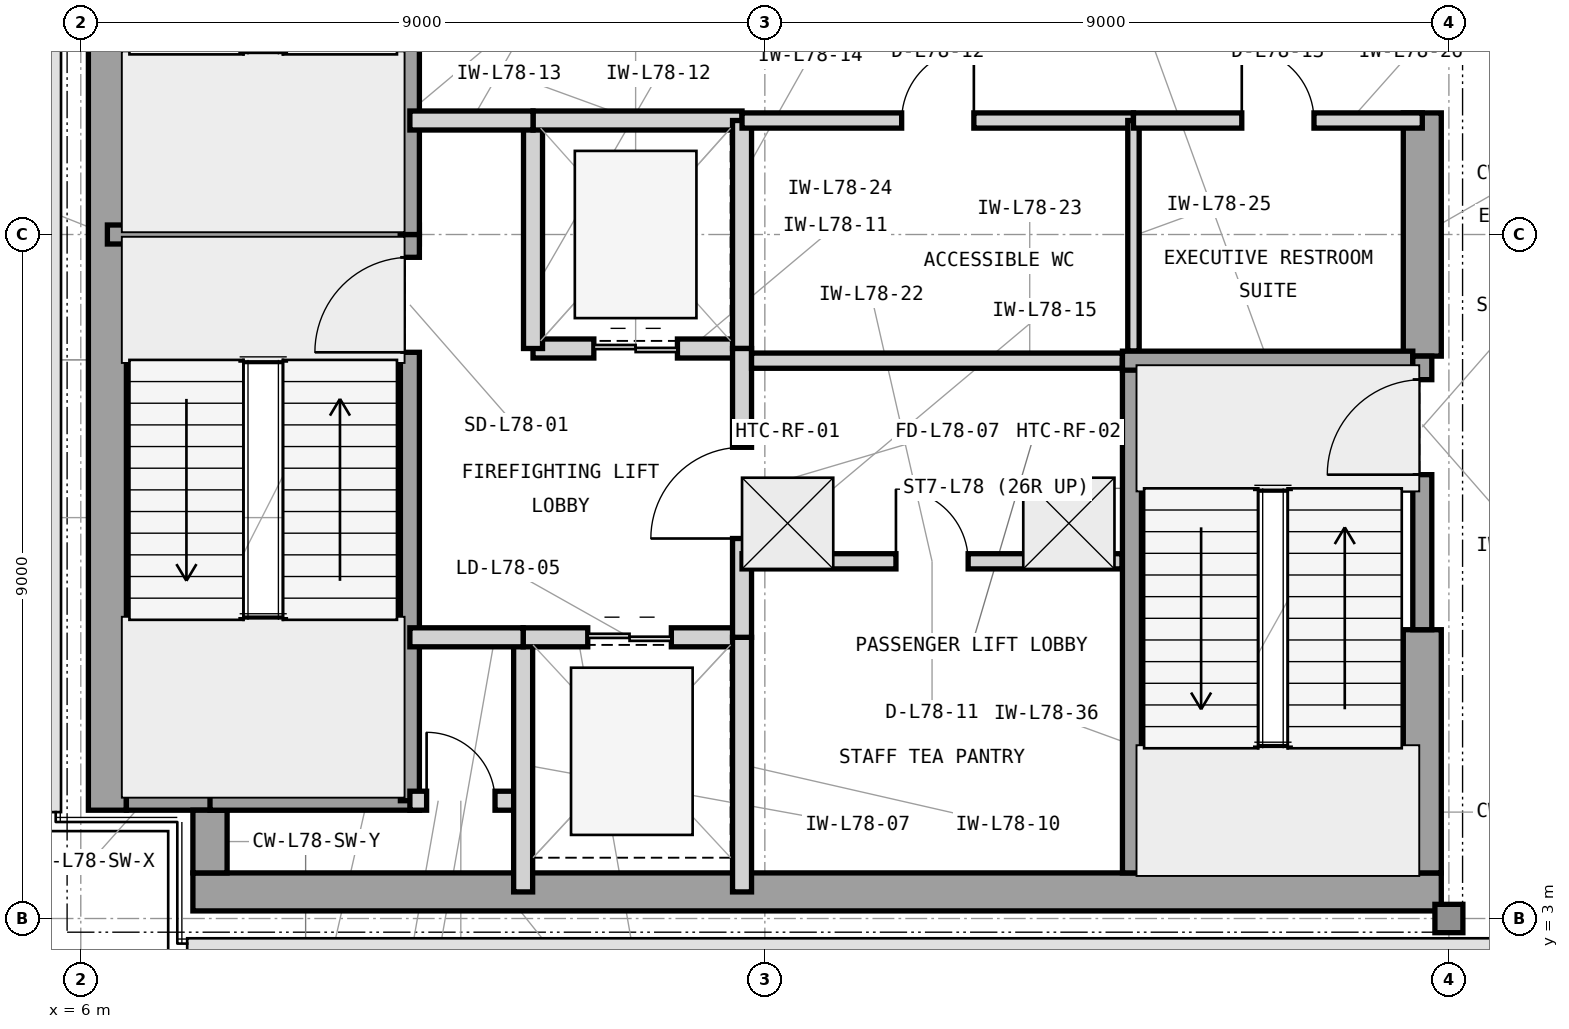
"""IFC4 building model, lengths in metres.
Left out: names, types, materials, properties, quantities, classifications, styles, units other than length and angle.
Written with IfcOpenShell. Run it as: python <this file> out.ifc"""

import sys

from ifc_helpers import new_model, si_unit, direction, frame, frame_2d, origin, origin_2d, place, context, subcontext, project, spatial, rectangle, i_section, extrude, element, fill, save


model = new_model("IFC4")
c1 = context("Model", 3, precision=1e-05, world=origin(), true_north=direction((0.0, 1.0)))
c2 = subcontext(c1, "Body", "Model", "MODEL_VIEW")
j1 = project(units=[si_unit("LENGTHUNIT", "METRE"), si_unit("PLANEANGLEUNIT", "RADIAN")], contexts=[c1])
p1 = place(None, origin())
s1 = spatial("IfcSite", under=j1, at=p1, CompositionType="ELEMENT")
p2 = place(p1, origin())
s2 = spatial("IfcBuilding", under=s1, at=p2, CompositionType="ELEMENT")
p3 = place(p2, frame((0.0, 0.0, 317.7)))
s3 = spatial("IfcBuildingStorey", under=s2, at=p3, CompositionType="ELEMENT", Elevation=317.7)
p4 = place(p3, frame((7.475, 3.35, 0.0), z_axis=(0.0, 0.0, 1.0), x_axis=(1.0, 0.0, 0.0)))
e1 = element("IfcWall", 1, at=p4, inside=s3, PredefinedType="SHEAR", context=c2, shape_type="SweptSolid", body=[
    extrude(rectangle(XDim=16.425, YDim=0.5, at=frame_2d((8.212, 0.0))), origin(), (0.0, 0.0, 1.0), 4.5),
])
p5 = place(p3, frame((6.35, 4.425, 0.0), z_axis=(0.0, 0.0, 1.0), x_axis=(0.0, 1.0, 0.0)))
e2 = element("IfcWall", 2, at=p5, inside=s3, PredefinedType="SHEAR", context=c2, shape_type="SweptSolid", body=[
    extrude(rectangle(XDim=15.15, YDim=0.5, at=frame_2d((7.575, 0.0))), origin(), (0.0, 0.0, 1.0), 4.5),
])
p6 = place(p3, frame((23.65, 3.6, 0.0), z_axis=(0.0, 0.0, 1.0), x_axis=(0.0, 1.0, 0.0)))
e3 = element("IfcWall", 3, at=p6, inside=s3, PredefinedType="SHEAR", context=c2, shape_type="SweptSolid", body=[
    extrude(rectangle(XDim=3.2, YDim=0.5, at=frame_2d((1.6, 0.0))), origin(), (0.0, 0.0, 1.0), 4.5),
])
p7 = place(p3, frame((23.65, 10.4, 0.0), z_axis=(0.0, 0.0, 1.0), x_axis=(0.0, 1.0, 0.0)))
e4 = element("IfcWall", 4, at=p7, inside=s3, PredefinedType="SHEAR", context=c2, shape_type="SweptSolid", body=[
    extrude(rectangle(XDim=3.2, YDim=0.5, at=frame_2d((1.6, 0.0))), origin(), (0.0, 0.0, 1.0), 4.5),
])
p8 = place(p3, frame((6.6, 4.65, 0.0), z_axis=(0.0, 0.0, 1.0), x_axis=(1.0, 0.0, 0.0)))
e5 = element("IfcWall", 5, at=p8, inside=s3, PredefinedType="SHEAR", context=c2, shape_type="SweptSolid", body=[
    extrude(rectangle(XDim=1.325, YDim=0.45, at=frame_2d((0.663, 0.0))), origin(), (0.0, 0.0, 1.0), 4.5),
])
p9 = place(p3, frame((7.7, 3.6, 0.0), z_axis=(0.0, 0.0, 1.0), x_axis=(0.0, 1.0, 0.0)))
e6 = element("IfcWall", 6, at=p9, inside=s3, PredefinedType="SHEAR", context=c2, shape_type="SweptSolid", body=[
    extrude(rectangle(XDim=0.825, YDim=0.45, at=frame_2d((0.413, 0.0))), origin(), (0.0, 0.0, 1.0), 4.5),
])
p10 = place(p3, frame((24.0, 3.0, 0.0), z_axis=(0.0, 0.0, 1.0), x_axis=(1.0, 0.0, 0.0)))
e7 = element("IfcColumn", 7, at=p10, inside=s3, PredefinedType="COLUMN", context=c2, shape_type="SweptSolid", body=[
    extrude(i_section(OverallWidth=0.373, OverallDepth=0.368, WebThickness=0.015, FlangeThickness=0.024, FilletRadius=0.019, at=origin_2d()), origin(), (0.0, 0.0, 1.0), 4.5),
])
p11 = place(p3, frame((6.35, 12.0, 0.0), z_axis=(0.0, 0.0, 1.0), x_axis=(1.0, 0.0, 0.0)))
e8 = element("IfcWall", 8, at=p11, inside=s3, PredefinedType="SHEAR", context=c2, shape_type="SweptSolid", body=[
    extrude(rectangle(XDim=4.105, YDim=0.25, at=frame_2d((2.052, 0.0))), origin(), (0.0, 0.0, 1.0), 4.5),
])
p12 = place(p3, frame((7.7, 4.55, 0.0), z_axis=(0.0, 0.0, 1.0), x_axis=(1.0, 0.0, 0.0)))
e9 = element("IfcWall", 9, at=p12, inside=s3, PredefinedType="SHEAR", context=c2, shape_type="SweptSolid", body=[
    extrude(rectangle(XDim=2.755, YDim=0.25, at=frame_2d((1.377, 0.0))), origin(), (0.0, 0.0, 1.0), 4.5),
])
p13 = place(p3, frame((10.33, 4.55, 0.0), z_axis=(0.0, 0.0, 1.0), x_axis=(0.0, 1.0, 0.0)))
e10 = element("IfcWall", 10, at=p13, inside=s3, PredefinedType="SHEAR", context=c2, shape_type="SweptSolid", body=[
    extrude(rectangle(XDim=7.45, YDim=0.25, at=frame_2d((3.725, 0.0))), origin(), (0.0, 0.0, 1.0), 4.5),
])
p14 = place(p13, frame((5.9, 0.0, 0.0)))
e11 = element("IfcOpeningElement", 11, at=p14, cuts=e10, PredefinedType="OPENING", context=c2, shape_type="SweptSolid", body=[
    extrude(rectangle(XDim=1.25, YDim=2.2, at=frame_2d((0.625, 1.1))), frame((0.0, 0.135, 0.0), z_axis=(0.0, -1.0, 0.0), x_axis=(1.0, 0.0, 0.0)), (0.0, 0.0, 1.0), 0.27),
])
p15 = place(p3, frame((10.33, 12.0, 0.0), z_axis=(0.0, 0.0, 1.0), x_axis=(0.0, 1.0, 0.0)))
e12 = element("IfcWall", 12, at=p15, inside=s3, PredefinedType="SHEAR", context=c2, shape_type="SweptSolid", body=[
    extrude(rectangle(XDim=7.45, YDim=0.25, at=frame_2d((3.725, 0.0))), origin(), (0.0, 0.0, 1.0), 4.5),
])
p16 = place(p15, frame((5.85, 0.0, 0.0)))
e13 = element("IfcOpeningElement", 13, at=p16, cuts=e12, PredefinedType="OPENING", context=c2, shape_type="SweptSolid", body=[
    extrude(rectangle(XDim=1.25, YDim=2.2, at=frame_2d((0.625, 1.1))), frame((0.0, 0.135, 0.0), z_axis=(0.0, -1.0, 0.0), x_axis=(1.0, 0.0, 0.0)), (0.0, 0.0, 1.0), 0.27),
])
p17 = place(p3, frame((10.33, 4.55, 0.0), z_axis=(0.0, 0.0, 1.0), x_axis=(1.0, 0.0, 0.0)))
e14 = element("IfcWall", 14, at=p17, inside=s3, PredefinedType="PARTITIONING", context=c2, shape_type="SweptSolid", body=[
    extrude(rectangle(XDim=1.49, YDim=0.25, at=frame_2d((0.745, 0.0))), origin(), (0.0, 0.0, 1.0), 4.23),
])
p18 = place(p17, frame((0.22, 0.0, 0.0)))
e15 = element("IfcOpeningElement", 15, at=p18, cuts=e14, PredefinedType="OPENING", context=c2, shape_type="SweptSolid", body=[
    extrude(rectangle(XDim=0.9, YDim=2.1, at=frame_2d((0.45, 1.05))), frame((0.0, 0.135, 0.0), z_axis=(0.0, -1.0, 0.0), x_axis=(1.0, 0.0, 0.0)), (0.0, 0.0, 1.0), 0.27),
])
p19 = place(p3, frame((11.82, 3.35, 0.0), z_axis=(0.0, 0.0, 1.0), x_axis=(0.0, 1.0, 0.0)))
e16 = element("IfcWall", 16, at=p19, inside=s3, PredefinedType="PARTITIONING", context=c2, shape_type="SweptSolid", body=[
    extrude(rectangle(XDim=3.35, YDim=0.25, at=frame_2d((1.675, 0.0))), origin(), (0.0, 0.0, 1.0), 4.23),
])
p20 = place(p3, frame((11.82, 6.7, 0.0), z_axis=(0.0, 0.0, 1.0), x_axis=(1.0, 0.0, 0.0)))
e17 = element("IfcWall", 17, at=p20, inside=s3, PredefinedType="PARTITIONING", context=c2, shape_type="SweptSolid", body=[
    extrude(rectangle(XDim=2.88, YDim=0.25, at=frame_2d((1.44, 0.0))), origin(), (0.0, 0.0, 1.0), 3.92),
])
p21 = place(p20, frame((0.85, 0.0, 0.0)))
e18 = element("IfcOpeningElement", 18, at=p21, cuts=e17, PredefinedType="OPENING", context=c2, shape_type="SweptSolid", body=[
    extrude(rectangle(XDim=1.1, YDim=2.25, at=frame_2d((0.55, 1.125))), frame((0.0, 0.135, 0.0), z_axis=(0.0, -1.0, 0.0), x_axis=(1.0, 0.0, 0.0)), (0.0, 0.0, 1.0), 0.27),
])
p22 = place(p3, frame((14.7, 3.35, 0.0), z_axis=(0.0, 0.0, 1.0), x_axis=(0.0, 1.0, 0.0)))
e19 = element("IfcWall", 19, at=p22, inside=s3, PredefinedType="PARTITIONING", context=c2, shape_type="SweptSolid", body=[
    extrude(rectangle(XDim=3.35, YDim=0.25, at=frame_2d((1.675, 0.0))), origin(), (0.0, 0.0, 1.0), 4.23),
])
p23 = place(p3, frame((11.95, 10.5, 0.0), z_axis=(0.0, 0.0, 1.0), x_axis=(1.0, 0.0, 0.0)))
e20 = element("IfcWall", 20, at=p23, inside=s3, PredefinedType="PARTITIONING", context=c2, shape_type="SweptSolid", body=[
    extrude(rectangle(XDim=2.75, YDim=0.25, at=frame_2d((1.375, 0.0))), origin(), (0.0, 0.0, 1.0), 3.92),
])
p24 = place(p23, frame((0.8, 0.0, 0.0)))
e21 = element("IfcOpeningElement", 21, at=p24, cuts=e20, PredefinedType="OPENING", context=c2, shape_type="SweptSolid", body=[
    extrude(rectangle(XDim=1.1, YDim=2.25, at=frame_2d((0.55, 1.125))), frame((0.0, 0.135, 0.0), z_axis=(0.0, -1.0, 0.0), x_axis=(1.0, 0.0, 0.0)), (0.0, 0.0, 1.0), 0.27),
])
p25 = place(p3, frame((11.95, 10.5, 0.0), z_axis=(0.0, 0.0, 1.0), x_axis=(0.0, 1.0, 0.0)))
e22 = element("IfcWall", 22, at=p25, inside=s3, PredefinedType="PARTITIONING", context=c2, shape_type="SweptSolid", body=[
    extrude(rectangle(XDim=3.0, YDim=0.25, at=frame_2d((1.5, 0.0))), origin(), (0.0, 0.0, 1.0), 4.23),
])
p26 = place(p3, frame((11.95, 13.5, 0.0), z_axis=(0.0, 0.0, 1.0), x_axis=(1.0, 0.0, 0.0)))
e23 = element("IfcWall", 23, at=p26, inside=s3, PredefinedType="PARTITIONING", context=c2, shape_type="SweptSolid", body=[
    extrude(rectangle(XDim=2.75, YDim=0.25, at=frame_2d((1.375, 0.0))), origin(), (0.0, 0.0, 1.0), 3.92),
])
p27 = place(p3, frame((14.7, 10.5, 0.0), z_axis=(0.0, 0.0, 1.0), x_axis=(0.0, 1.0, 0.0)))
e24 = element("IfcWall", 24, at=p27, inside=s3, PredefinedType="PARTITIONING", context=c2, shape_type="SweptSolid", body=[
    extrude(rectangle(XDim=3.0, YDim=0.25, at=frame_2d((1.5, 0.0))), origin(), (0.0, 0.0, 1.0), 4.23),
])
p28 = place(p3, frame((14.7, 6.7, 0.0), z_axis=(0.0, 0.0, 1.0), x_axis=(0.0, 1.0, 0.0)))
e25 = element("IfcWall", 25, at=p28, inside=s3, PredefinedType="PARTITIONING", context=c2, shape_type="SweptSolid", body=[
    extrude(rectangle(XDim=3.8, YDim=0.25, at=frame_2d((1.9, 0.0))), origin(), (0.0, 0.0, 1.0), 4.23),
])
p29 = place(p28, frame((1.3, 0.0, 0.0)))
e26 = element("IfcOpeningElement", 26, at=p29, cuts=e25, PredefinedType="OPENING", context=c2, shape_type="SweptSolid", body=[
    extrude(rectangle(XDim=1.2, YDim=2.2, at=frame_2d((0.6, 1.1))), frame((0.0, 0.135, 0.0), z_axis=(0.0, -1.0, 0.0), x_axis=(1.0, 0.0, 0.0)), (0.0, 0.0, 1.0), 0.27),
])
p30 = place(p3, frame((10.33, 13.5, 0.0), z_axis=(0.0, 0.0, 1.0), x_axis=(1.0, 0.0, 0.0)))
e27 = element("IfcWall", 27, at=p30, inside=s3, PredefinedType="PARTITIONING", context=c2, shape_type="SweptSolid", body=[
    extrude(rectangle(XDim=1.62, YDim=0.25, at=frame_2d((0.81, 0.0))), origin(), (0.0, 0.0, 1.0), 3.92),
])
p31 = place(p3, frame((10.33, 6.7, 0.0), z_axis=(0.0, 0.0, 1.0), x_axis=(1.0, 0.0, 0.0)))
e28 = element("IfcWall", 28, at=p31, inside=s3, PredefinedType="PARTITIONING", context=c2, shape_type="SweptSolid", body=[
    extrude(rectangle(XDim=1.49, YDim=0.25, at=frame_2d((0.745, 0.0))), origin(), (0.0, 0.0, 1.0), 3.92),
])
p32 = place(p3, frame((14.7, 7.7, 0.0), z_axis=(0.0, 0.0, 1.0), x_axis=(1.0, 0.0, 0.0)))
e29 = element("IfcWall", 29, at=p32, inside=s3, PredefinedType="PARTITIONING", context=c2, shape_type="SweptSolid", body=[
    extrude(rectangle(XDim=5.0, YDim=0.2, at=frame_2d((2.5, 0.0))), origin(), (0.0, 0.0, 1.0), 4.23),
])
p33 = place(p32, frame((2.025, 0.0, 0.0)))
e30 = element("IfcOpeningElement", 30, at=p33, cuts=e29, PredefinedType="OPENING", context=c2, shape_type="SweptSolid", body=[
    extrude(rectangle(XDim=0.95, YDim=2.1, at=frame_2d((0.475, 1.05))), frame((0.0, 0.11, 0.0), z_axis=(0.0, -1.0, 0.0), x_axis=(1.0, 0.0, 0.0)), (0.0, 0.0, 1.0), 0.22),
])
p34 = place(p3, frame((14.825, 10.34, 0.0), z_axis=(0.0, 0.0, 1.0), x_axis=(1.0, 0.0, 0.0)))
e31 = element("IfcWall", 31, at=p34, inside=s3, PredefinedType="PARTITIONING", context=c2, shape_type="SweptSolid", body=[
    extrude(rectangle(XDim=4.88, YDim=0.2, at=frame_2d((2.44, 0.0))), origin(), (0.0, 0.0, 1.0), 4.23),
])
p35 = place(p3, frame((14.7, 13.5, 0.0), z_axis=(0.0, 0.0, 1.0), x_axis=(1.0, 0.0, 0.0)))
e32 = element("IfcWall", 32, at=p35, inside=s3, PredefinedType="PARTITIONING", context=c2, shape_type="SweptSolid", body=[
    extrude(rectangle(XDim=5.15, YDim=0.2, at=frame_2d((2.575, 0.0))), origin(), (0.0, 0.0, 1.0), 3.92),
])
p36 = place(p35, frame((2.1, 0.0, 0.0)))
e33 = element("IfcOpeningElement", 33, at=p36, cuts=e32, PredefinedType="OPENING", context=c2, shape_type="SweptSolid", body=[
    extrude(rectangle(XDim=0.95, YDim=2.1, at=frame_2d((0.475, 1.05))), frame((0.0, 0.11, 0.0), z_axis=(0.0, -1.0, 0.0), x_axis=(1.0, 0.0, 0.0)), (0.0, 0.0, 1.0), 0.22),
])
p37 = place(p3, frame((19.85, 10.465, 0.0), z_axis=(0.0, 0.0, 1.0), x_axis=(0.0, 1.0, 0.0)))
e34 = element("IfcWall", 34, at=p37, inside=s3, PredefinedType="PARTITIONING", context=c2, shape_type="SweptSolid", body=[
    extrude(rectangle(XDim=3.035, YDim=0.15, at=frame_2d((1.518, 0.0))), origin(), (0.0, 0.0, 1.0), 4.23),
])
p38 = place(p3, frame((19.85, 13.5, 0.0), z_axis=(0.0, 0.0, 1.0), x_axis=(1.0, 0.0, 0.0)))
e35 = element("IfcWall", 35, at=p38, inside=s3, PredefinedType="PARTITIONING", context=c2, shape_type="SweptSolid", body=[
    extrude(rectangle(XDim=3.8, YDim=0.2, at=frame_2d((1.9, 0.0))), origin(), (0.0, 0.0, 1.0), 3.92),
])
p39 = place(p38, frame((1.425, 0.0, 0.0)))
e36 = element("IfcOpeningElement", 36, at=p39, cuts=e35, PredefinedType="OPENING", context=c2, shape_type="SweptSolid", body=[
    extrude(rectangle(XDim=0.95, YDim=2.1, at=frame_2d((0.475, 1.05))), frame((0.0, 0.11, 0.0), z_axis=(0.0, -1.0, 0.0), x_axis=(1.0, 0.0, 0.0)), (0.0, 0.0, 1.0), 0.22),
])
p40 = place(p3, frame((19.83, 3.6, 0.0), z_axis=(0.0, 0.0, 1.0), x_axis=(0.0, 1.0, 0.0)))
e37 = element("IfcWall", 37, at=p40, inside=s3, PredefinedType="SHEAR", context=c2, shape_type="SweptSolid", body=[
    extrude(rectangle(XDim=6.74, YDim=0.25, at=frame_2d((3.37, 0.0))), origin(), (0.0, 0.0, 1.0), 4.5),
])
p41 = place(p3, frame((19.705, 10.34, 0.0), z_axis=(0.0, 0.0, 1.0), x_axis=(1.0, 0.0, 0.0)))
e38 = element("IfcWall", 38, at=p41, inside=s3, PredefinedType="SHEAR", context=c2, shape_type="SweptSolid", body=[
    extrude(rectangle(XDim=3.82, YDim=0.25, at=frame_2d((1.91, 0.0))), origin(), (0.0, 0.0, 1.0), 4.5),
])
p42 = place(p3, frame((23.65, 6.8, 0.0), z_axis=(0.0, 0.0, 1.0), x_axis=(0.0, 1.0, 0.0)))
e39 = element("IfcWall", 39, at=p42, inside=s3, PredefinedType="SHEAR", context=c2, shape_type="SweptSolid", body=[
    extrude(rectangle(XDim=3.6, YDim=0.25, at=frame_2d((1.8, 0.0))), origin(), (0.0, 0.0, 1.0), 4.5),
])
p43 = place(p42, frame((2.04, 0.0, 0.0)))
e40 = element("IfcOpeningElement", 40, at=p43, cuts=e39, PredefinedType="OPENING", context=c2, shape_type="SweptSolid", body=[
    extrude(rectangle(XDim=1.25, YDim=2.2, at=frame_2d((0.625, 1.1))), frame((0.0, 0.135, 0.0), z_axis=(0.0, -1.0, 0.0), x_axis=(1.0, 0.0, 0.0)), (0.0, 0.0, 1.0), 0.27),
])
p44 = place(p2, frame((0.0, 0.0, 322.2)))
p45 = place(p44, frame((0.0, 0.0, -0.26)))
p46 = place(p45, frame((15.3, 8.2, 0.0)))
p47 = place(p46, frame((0.0, 0.0, 0.21)))
e41 = element("IfcWindow", 41, at=p47, inside=s3, PartitioningType="SINGLE_PANEL", PredefinedType="SKYLIGHT", context=c2, shape_type="SweptSolid", body=[
    extrude(rectangle(XDim=1.2, YDim=1.2, at=origin_2d()), origin(), (0.0, 0.0, 1.0), 0.05),
])
p48 = place(p45, frame((19.0, 8.2, 0.0)))
p49 = place(p48, frame((0.0, 0.0, 0.21)))
e42 = element("IfcWindow", 42, at=p49, inside=s3, PartitioningType="SINGLE_PANEL", PredefinedType="SKYLIGHT", context=c2, shape_type="SweptSolid", body=[
    extrude(rectangle(XDim=1.2, YDim=1.2, at=origin_2d()), origin(), (0.0, 0.0, 1.0), 0.05),
])
p50 = place(p14, origin())
e43 = element("IfcDoor", 43, at=p50, inside=s3, OperationType="SINGLE_SWING_LEFT", PredefinedType="DOOR", context=c2, shape_type="SweptSolid", body=[
    extrude(rectangle(XDim=1.25, YDim=2.2, at=frame_2d((0.625, 1.1))), frame((0.0, 0.025, 0.0), z_axis=(0.0, -1.0, 0.0), x_axis=(1.0, 0.0, 0.0)), (0.0, 0.0, 1.0), 0.05),
])
fill(e11, e43)
p51 = place(p18, origin())
e44 = element("IfcDoor", 44, at=p51, inside=s3, OperationType="SINGLE_SWING_LEFT", PredefinedType="TRAPDOOR", context=c2, shape_type="SweptSolid", body=[
    extrude(rectangle(XDim=0.9, YDim=2.1, at=frame_2d((0.45, 1.05))), frame((0.0, 0.025, 0.0), z_axis=(0.0, -1.0, 0.0), x_axis=(1.0, 0.0, 0.0)), (0.0, 0.0, 1.0), 0.05),
])
fill(e15, e44)
p52 = place(p21, origin())
e45 = element("IfcDoor", 45, at=p52, inside=s3, OperationType="DOUBLE_DOOR_SLIDING", PredefinedType="DOOR", context=c2, shape_type="SweptSolid", body=[
    extrude(rectangle(XDim=1.1, YDim=2.25, at=frame_2d((0.55, 1.125))), frame((0.0, 0.025, 0.0), z_axis=(0.0, -1.0, 0.0), x_axis=(1.0, 0.0, 0.0)), (0.0, 0.0, 1.0), 0.05),
])
fill(e18, e45)
p53 = place(p24, origin())
e46 = element("IfcDoor", 46, at=p53, inside=s3, OperationType="DOUBLE_DOOR_SLIDING", PredefinedType="DOOR", context=c2, shape_type="SweptSolid", body=[
    extrude(rectangle(XDim=1.1, YDim=2.25, at=frame_2d((0.55, 1.125))), frame((0.0, 0.025, 0.0), z_axis=(0.0, -1.0, 0.0), x_axis=(1.0, 0.0, 0.0)), (0.0, 0.0, 1.0), 0.05),
])
fill(e21, e46)
p54 = place(p29, origin())
e47 = element("IfcDoor", 47, at=p54, inside=s3, OperationType="SINGLE_SWING_LEFT", PredefinedType="DOOR", context=c2, shape_type="SweptSolid", body=[
    extrude(rectangle(XDim=1.2, YDim=2.2, at=frame_2d((0.6, 1.1))), frame((0.0, 0.025, 0.0), z_axis=(0.0, -1.0, 0.0), x_axis=(1.0, 0.0, 0.0)), (0.0, 0.0, 1.0), 0.05),
])
fill(e26, e47)
p55 = place(p33, origin())
e48 = element("IfcDoor", 48, at=p55, inside=s3, OperationType="SINGLE_SWING_LEFT", PredefinedType="DOOR", context=c2, shape_type="SweptSolid", body=[
    extrude(rectangle(XDim=0.95, YDim=2.1, at=frame_2d((0.475, 1.05))), frame((0.0, 0.025, 0.0), z_axis=(0.0, -1.0, 0.0), x_axis=(1.0, 0.0, 0.0)), (0.0, 0.0, 1.0), 0.05),
])
fill(e30, e48)
p56 = place(p36, origin())
e49 = element("IfcDoor", 49, at=p56, inside=s3, OperationType="SINGLE_SWING_RIGHT", PredefinedType="DOOR", context=c2, shape_type="SweptSolid", body=[
    extrude(rectangle(XDim=0.95, YDim=2.1, at=frame_2d((0.475, 1.05))), frame((0.0, 0.025, 0.0), z_axis=(0.0, -1.0, 0.0), x_axis=(1.0, 0.0, 0.0)), (0.0, 0.0, 1.0), 0.05),
])
fill(e33, e49)
p57 = place(p39, origin())
e50 = element("IfcDoor", 50, at=p57, inside=s3, OperationType="SINGLE_SWING_LEFT", PredefinedType="DOOR", context=c2, shape_type="SweptSolid", body=[
    extrude(rectangle(XDim=0.95, YDim=2.1, at=frame_2d((0.475, 1.05))), frame((0.0, 0.025, 0.0), z_axis=(0.0, -1.0, 0.0), x_axis=(1.0, 0.0, 0.0)), (0.0, 0.0, 1.0), 0.05),
])
fill(e36, e50)
p58 = place(p43, origin())
e51 = element("IfcDoor", 51, at=p58, inside=s3, OperationType="SINGLE_SWING_LEFT", PredefinedType="DOOR", context=c2, shape_type="SweptSolid", body=[
    extrude(rectangle(XDim=1.25, YDim=2.2, at=frame_2d((0.625, 1.1))), frame((0.0, 0.025, 0.0), z_axis=(0.0, -1.0, 0.0), x_axis=(1.0, 0.0, 0.0)), (0.0, 0.0, 1.0), 0.05),
])
fill(e40, e51)
save(model, sys.argv[1])
